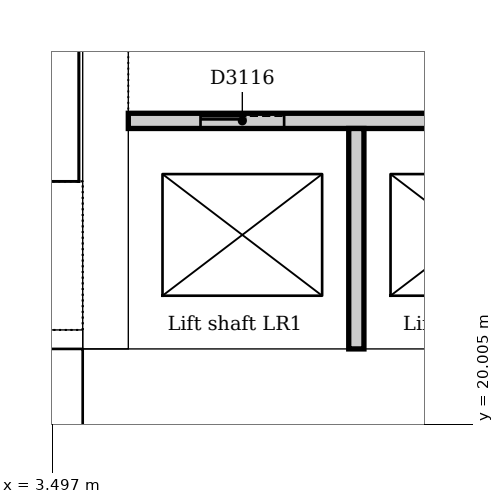
"""IFC4 building model, lengths in metres.
Left out: names, types, materials, properties, quantities, classifications, styles, units other than length and angle.
Written with IfcOpenShell. Run it as: python <this file> out.ifc"""

import sys

from ifc_helpers import new_model, si_unit, direction, frame, frame_2d, origin, place, context, subcontext, project, spatial, rectangle, extrude, element, fill, save


model = new_model("IFC4")
c1 = context("Model", 3, precision=1e-05, world=origin(), true_north=direction((0.0, 1.0)))
c2 = subcontext(c1, "Body", "Model", "MODEL_VIEW")
j1 = project(units=[si_unit("LENGTHUNIT", "METRE"), si_unit("PLANEANGLEUNIT", "RADIAN")], contexts=[c1])
p1 = place(None, origin())
s1 = spatial("IfcSite", under=j1, at=p1, CompositionType="ELEMENT")
p2 = place(p1, origin())
s2 = spatial("IfcBuilding", under=s1, at=p2, CompositionType="ELEMENT")
p3 = place(p2, frame((0.0, 0.0, 11.0)))
s3 = spatial("IfcBuildingStorey", under=s2, at=p3, CompositionType="ELEMENT", Elevation=11.0)
p4 = place(p3, frame((3.9, 20.4, 0.0), z_axis=(0.0, 0.0, 1.0), x_axis=(1.0, 0.0, 0.0)))
e1 = element("IfcWall", 1, at=p4, inside=s3, PredefinedType="SOLIDWALL", context=c2, shape_type="SweptSolid", body=[
    extrude(rectangle(XDim=19.8, YDim=1.2, at=frame_2d((9.9, 0.0))), origin(), (0.0, 0.0, 1.0), 5.0),
])
p5 = place(p3, frame((4.2, 31.5, 0.0), z_axis=(0.0, 0.0, 1.0), x_axis=(0.0, -1.0, 0.0)))
e2 = element("IfcWall", 2, at=p5, inside=s3, PredefinedType="SOLIDWALL", context=c2, shape_type="SweptSolid", body=[
    extrude(rectangle(XDim=10.5, YDim=0.6, at=frame_2d((5.25, 0.0))), origin(), (0.0, 0.0, 1.0), 5.0),
])
p6 = place(p5, frame((4.25, 0.0, 0.0)))
e3 = element("IfcOpeningElement", 3, at=p6, cuts=e2, PredefinedType="OPENING", context=c2, shape_type="SweptSolid", body=[
    extrude(rectangle(XDim=1.0, YDim=2.1, at=frame_2d((0.5, 1.05))), frame((0.0, 0.31, 0.0), z_axis=(0.0, -1.0, 0.0), x_axis=(1.0, 0.0, 0.0)), (0.0, 0.0, 1.0), 0.62),
])
p7 = place(p3, frame((0.36, 21.125, 0.0), z_axis=(0.0, 0.0, 1.0), x_axis=(1.0, 0.0, 0.0)))
e4 = element("IfcWall", 4, at=p7, inside=s3, PredefinedType="SOLIDWALL", context=c2, shape_type="SweptSolid", body=[
    extrude(rectangle(XDim=3.54, YDim=0.25, at=frame_2d((1.77, 0.0))), origin(), (0.0, 0.0, 1.0), 5.0),
])
p8 = place(p3, frame((4.5, 24.0, 0.0), z_axis=(0.0, 0.0, 1.0), x_axis=(1.0, 0.0, 0.0)))
e5 = element("IfcWall", 5, at=p8, inside=s3, PredefinedType="PARTITIONING", context=c2, shape_type="SweptSolid", body=[
    extrude(rectangle(XDim=18.0, YDim=0.2, at=frame_2d((9.0, 0.0))), origin(), (0.0, 0.0, 1.0), 4.7),
])
p9 = place(p8, frame((0.95, 0.0, 0.0)))
e6 = element("IfcOpeningElement", 6, at=p9, cuts=e5, PredefinedType="OPENING", context=c2, shape_type="SweptSolid", body=[
    extrude(rectangle(XDim=1.1, YDim=2.1, at=frame_2d((0.55, 1.05))), frame((0.0, 0.11, 0.0), z_axis=(0.0, -1.0, 0.0), x_axis=(1.0, 0.0, 0.0)), (0.0, 0.0, 1.0), 0.22),
])
p10 = place(p8, frame((3.95, 0.0, 0.0)))
e7 = element("IfcOpeningElement", 7, at=p10, cuts=e5, PredefinedType="OPENING", context=c2, shape_type="SweptSolid", body=[
    extrude(rectangle(XDim=1.1, YDim=2.1, at=frame_2d((0.55, 1.05))), frame((0.0, 0.11, 0.0), z_axis=(0.0, -1.0, 0.0), x_axis=(1.0, 0.0, 0.0)), (0.0, 0.0, 1.0), 0.22),
])
p11 = place(p8, frame((6.95, 0.0, 0.0)))
e8 = element("IfcOpeningElement", 8, at=p11, cuts=e5, PredefinedType="OPENING", context=c2, shape_type="SweptSolid", body=[
    extrude(rectangle(XDim=1.1, YDim=2.1, at=frame_2d((0.55, 1.05))), frame((0.0, 0.11, 0.0), z_axis=(0.0, -1.0, 0.0), x_axis=(1.0, 0.0, 0.0)), (0.0, 0.0, 1.0), 0.22),
])
p12 = place(p8, frame((9.95, 0.0, 0.0)))
e9 = element("IfcOpeningElement", 9, at=p12, cuts=e5, PredefinedType="OPENING", context=c2, shape_type="SweptSolid", body=[
    extrude(rectangle(XDim=1.1, YDim=2.1, at=frame_2d((0.55, 1.05))), frame((0.0, 0.11, 0.0), z_axis=(0.0, -1.0, 0.0), x_axis=(1.0, 0.0, 0.0)), (0.0, 0.0, 1.0), 0.22),
])
p13 = place(p8, frame((12.95, 0.0, 0.0)))
e10 = element("IfcOpeningElement", 10, at=p13, cuts=e5, PredefinedType="OPENING", context=c2, shape_type="SweptSolid", body=[
    extrude(rectangle(XDim=1.1, YDim=2.1, at=frame_2d((0.55, 1.05))), frame((0.0, 0.11, 0.0), z_axis=(0.0, -1.0, 0.0), x_axis=(1.0, 0.0, 0.0)), (0.0, 0.0, 1.0), 0.22),
])
p14 = place(p8, frame((15.95, 0.0, 0.0)))
e11 = element("IfcOpeningElement", 11, at=p14, cuts=e5, PredefinedType="OPENING", context=c2, shape_type="SweptSolid", body=[
    extrude(rectangle(XDim=1.1, YDim=2.1, at=frame_2d((0.55, 1.05))), frame((0.0, 0.11, 0.0), z_axis=(0.0, -1.0, 0.0), x_axis=(1.0, 0.0, 0.0)), (0.0, 0.0, 1.0), 0.22),
])
p15 = place(p3, frame((7.5, 21.0, 0.0), z_axis=(0.0, 0.0, 1.0), x_axis=(0.0, 1.0, 0.0)))
e12 = element("IfcWall", 12, at=p15, inside=s3, PredefinedType="PARTITIONING", context=c2, shape_type="SweptSolid", body=[
    extrude(rectangle(XDim=2.9, YDim=0.2, at=frame_2d((1.45, 0.0))), origin(), (0.0, 0.0, 1.0), 4.7),
])
p16 = place(p9, origin())
e13 = element("IfcDoor", 13, at=p16, inside=s3, OperationType="SLIDING_TO_LEFT", PredefinedType="DOOR", context=c2, shape_type="SweptSolid", body=[
    extrude(rectangle(XDim=1.1, YDim=2.1, at=frame_2d((0.55, 1.05))), frame((0.0, 0.025, 0.0), z_axis=(0.0, -1.0, 0.0), x_axis=(1.0, 0.0, 0.0)), (0.0, 0.0, 1.0), 0.05),
])
fill(e6, e13)
save(model, sys.argv[1])
